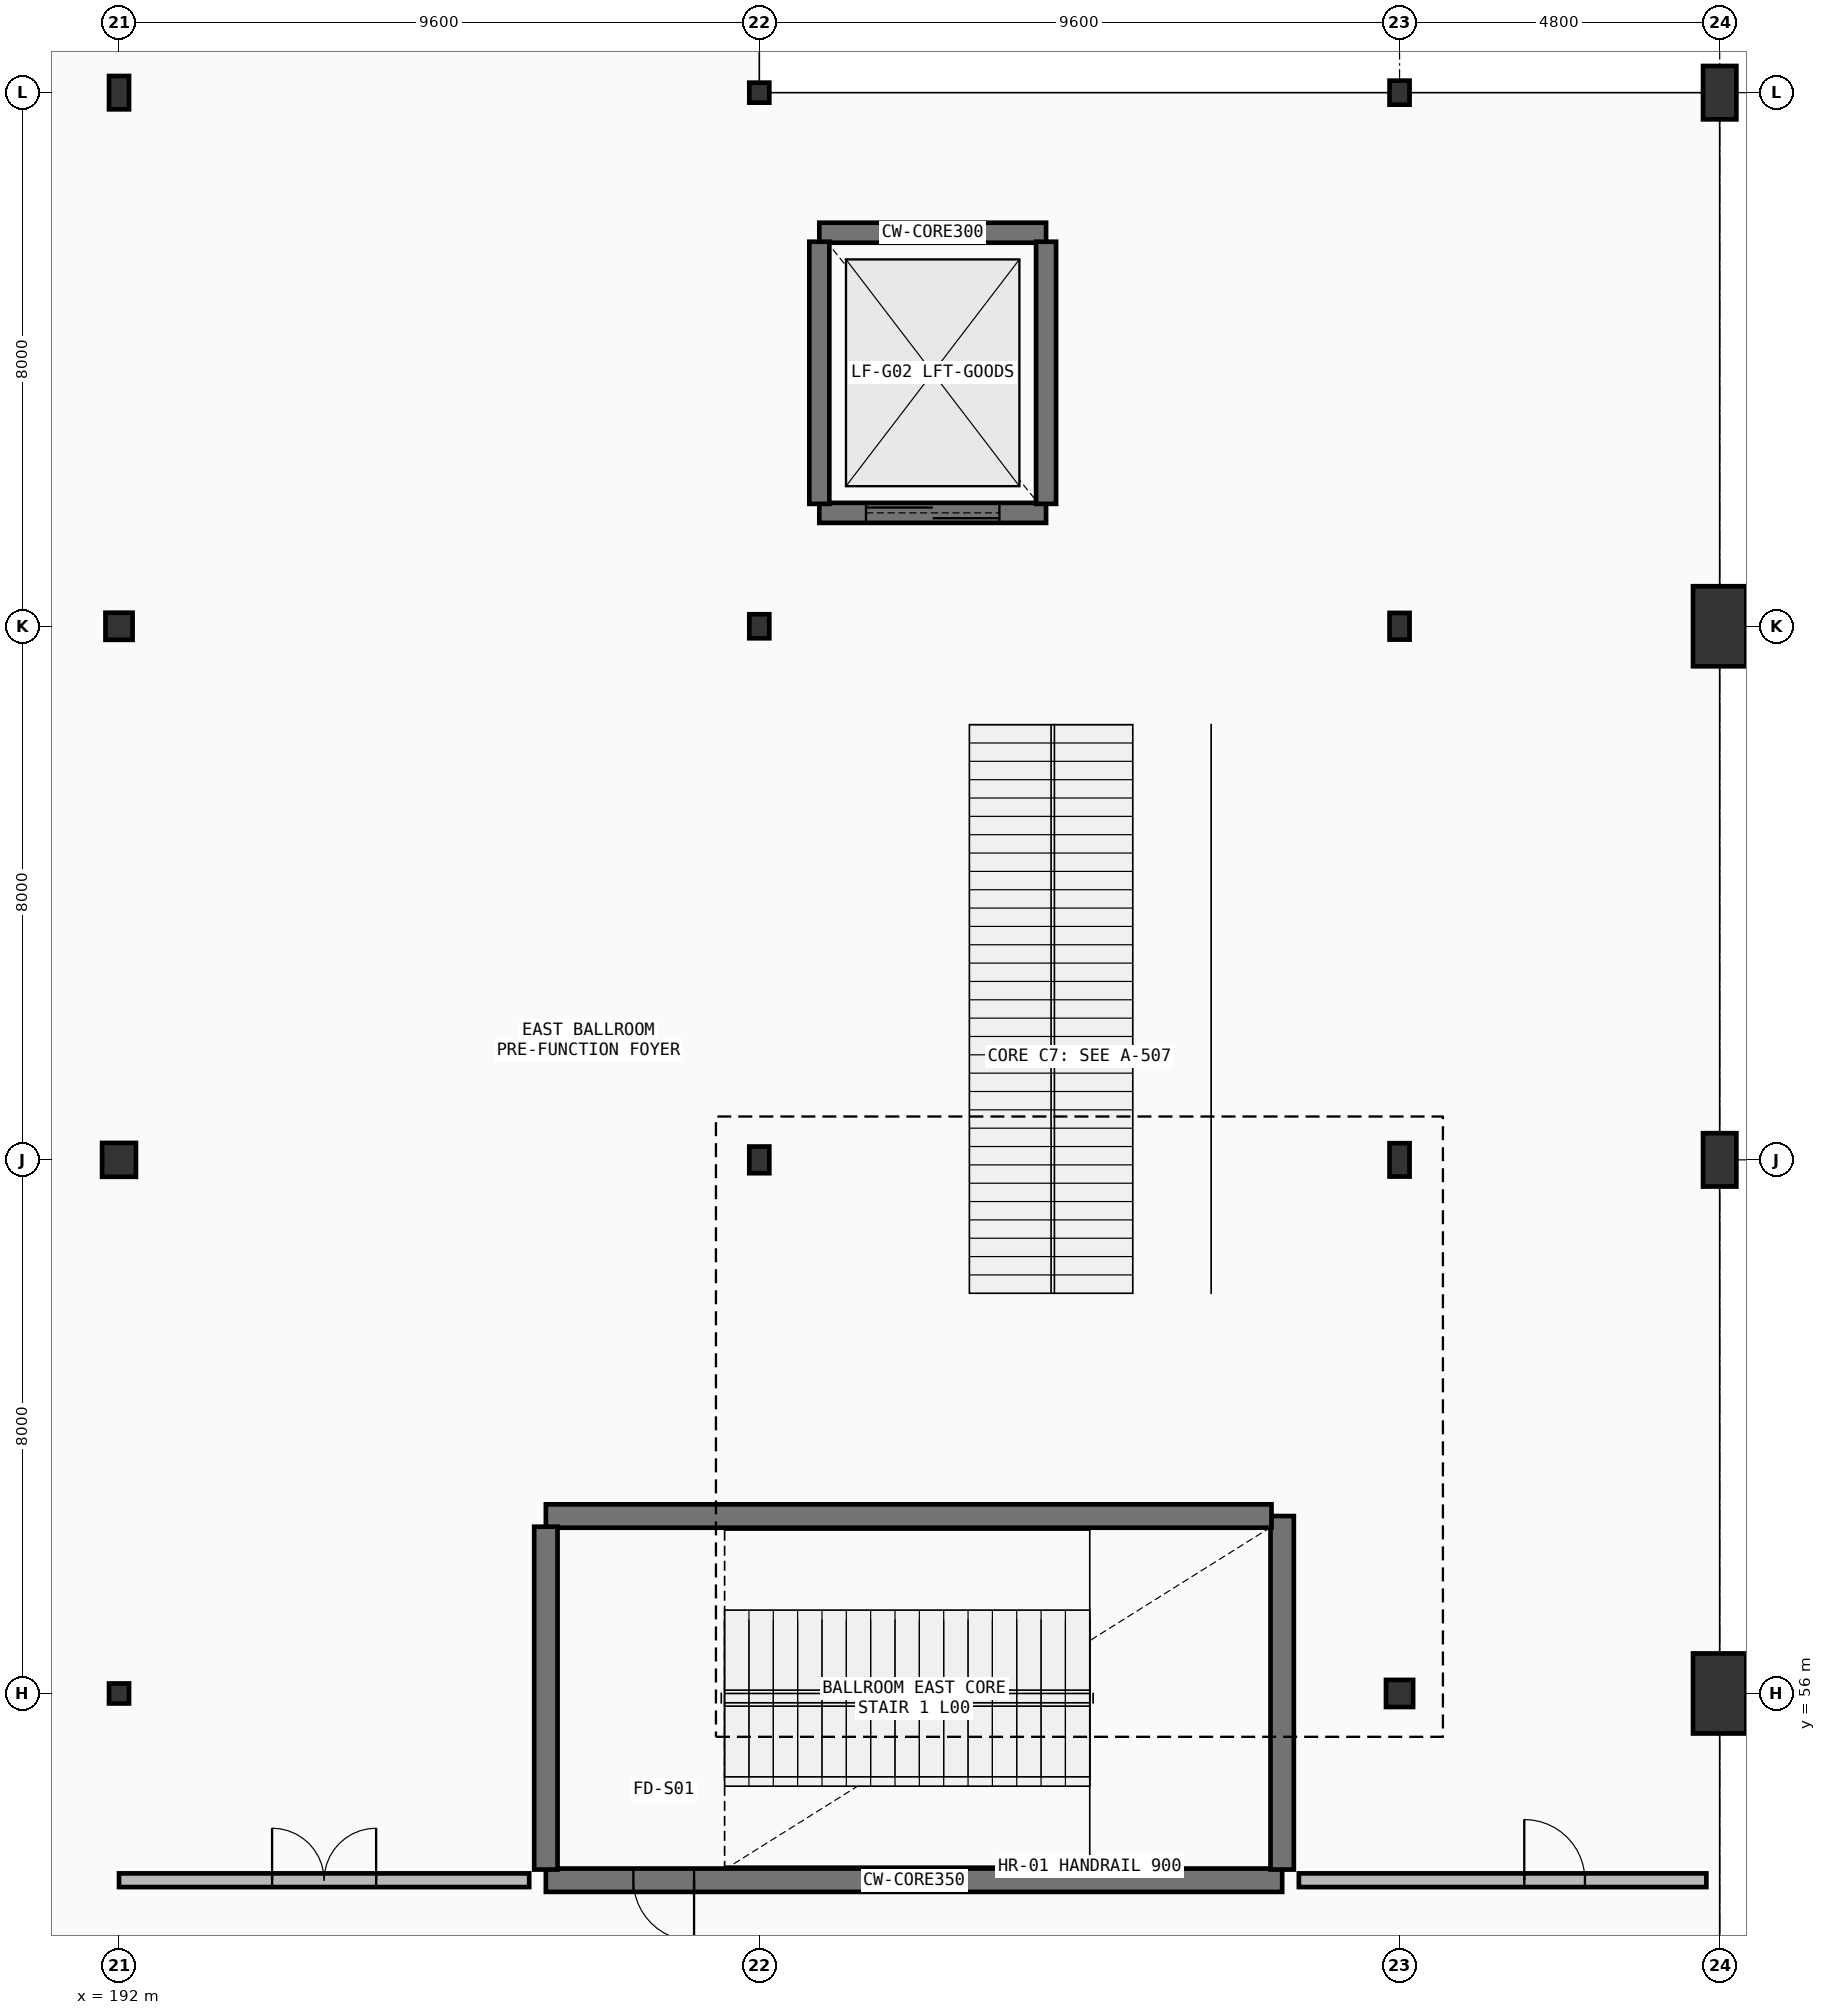
"""IFC4 building model, lengths in metres.
Left out: names, types, materials, properties, quantities, classifications, styles, units other than length and angle.
Written with IfcOpenShell. Run it as: python <this file> out.ifc"""

import sys

from ifc_helpers import new_model, si_unit, direction, frame, frame_2d, origin, origin_2d, place, context, subcontext, project, spatial, rectangle, hollow_circle, i_section, extrude, element, fill, save


model = new_model("IFC4")
c1 = context("Model", 3, precision=1e-05, world=origin(), true_north=direction((0.0, 1.0)))
c2 = subcontext(c1, "Body", "Model", "MODEL_VIEW")
j1 = project(units=[si_unit("LENGTHUNIT", "METRE"), si_unit("PLANEANGLEUNIT", "RADIAN")], contexts=[c1])
p1 = place(None, origin())
s1 = spatial("IfcSite", under=j1, at=p1, CompositionType="ELEMENT")
p2 = place(p1, origin())
s2 = spatial("IfcBuilding", under=s1, at=p2, CompositionType="ELEMENT")
p3 = place(p2, origin())
s3 = spatial("IfcBuildingStorey", under=s2, at=p3, CompositionType="ELEMENT", Elevation=0.0)
p4 = place(p3, frame((192.0, 56.0, 0.0), z_axis=(0.0, 0.0, 1.0), x_axis=(1.0, 0.0, 0.0)))
e1 = element("IfcColumn", 1, at=p4, inside=s3, PredefinedType="COLUMN", context=c2, shape_type="SweptSolid", body=[
    extrude(i_section(OverallWidth=0.3, OverallDepth=0.3, WebThickness=0.011, FlangeThickness=0.019, FilletRadius=0.027, at=origin_2d()), origin(), (0.0, 0.0, 1.0), 6.0),
])
p5 = place(p3, frame((192.0, 64.0, 0.0), z_axis=(0.0, 0.0, 1.0), x_axis=(1.0, 0.0, 0.0)))
e2 = element("IfcColumn", 2, at=p5, inside=s3, PredefinedType="COLUMN", context=c2, shape_type="SweptSolid", body=[
    extrude(hollow_circle(Radius=0.254, WallThickness=0.025, at=origin_2d()), origin(), (0.0, 0.0, 1.0), 6.0),
])
p6 = place(p3, frame((192.0, 72.0, 0.0), z_axis=(0.0, 0.0, 1.0), x_axis=(1.0, 0.0, 0.0)))
e3 = element("IfcColumn", 3, at=p6, inside=s3, PredefinedType="COLUMN", context=c2, shape_type="SweptSolid", body=[
    extrude(hollow_circle(Radius=0.203, WallThickness=0.02, at=origin_2d()), origin(), (0.0, 0.0, 1.0), 6.0),
])
p7 = place(p3, frame((192.0, 80.0, 0.0), z_axis=(0.0, 0.0, 1.0), x_axis=(1.0, 0.0, 0.0)))
e4 = element("IfcColumn", 4, at=p7, inside=s3, PredefinedType="COLUMN", context=c2, shape_type="SweptSolid", body=[
    extrude(i_section(OverallWidth=0.3, OverallDepth=0.5, WebThickness=0.014, FlangeThickness=0.028, FilletRadius=0.027, at=origin_2d()), origin(), (0.0, 0.0, 1.0), 6.0),
])
p8 = place(p3, frame((201.6, 64.0, 0.0), z_axis=(0.0, 0.0, 1.0), x_axis=(1.0, 0.0, 0.0)))
e5 = element("IfcColumn", 5, at=p8, inside=s3, PredefinedType="COLUMN", context=c2, shape_type="SweptSolid", body=[
    extrude(i_section(OverallWidth=0.3, OverallDepth=0.4, WebThickness=0.013, FlangeThickness=0.024, FilletRadius=0.027, at=origin_2d()), origin(), (0.0, 0.0, 1.0), 6.0),
])
p9 = place(p3, frame((201.6, 72.0, 0.0), z_axis=(0.0, 0.0, 1.0), x_axis=(1.0, 0.0, 0.0)))
e6 = element("IfcColumn", 6, at=p9, inside=s3, PredefinedType="COLUMN", context=c2, shape_type="SweptSolid", body=[
    extrude(i_section(OverallWidth=0.3, OverallDepth=0.36, WebThickness=0.012, FlangeThickness=0.022, FilletRadius=0.027, at=origin_2d()), origin(), (0.0, 0.0, 1.0), 6.0),
])
p10 = place(p3, frame((201.6, 80.0, 0.0), z_axis=(0.0, 0.0, 1.0), x_axis=(1.0, 0.0, 0.0)))
e7 = element("IfcColumn", 7, at=p10, inside=s3, PredefinedType="COLUMN", context=c2, shape_type="SweptSolid", body=[
    extrude(i_section(OverallWidth=0.3, OverallDepth=0.3, WebThickness=0.011, FlangeThickness=0.019, FilletRadius=0.027, at=origin_2d()), origin(), (0.0, 0.0, 1.0), 6.0),
])
p11 = place(p3, frame((211.2, 56.0, 0.0), z_axis=(0.0, 0.0, 1.0), x_axis=(1.0, 0.0, 0.0)))
e8 = element("IfcColumn", 8, at=p11, inside=s3, PredefinedType="COLUMN", context=c2, shape_type="SweptSolid", body=[
    extrude(hollow_circle(Radius=0.203, WallThickness=0.02, at=origin_2d()), origin(), (0.0, 0.0, 1.0), 6.0),
])
p12 = place(p3, frame((211.2, 64.0, 0.0), z_axis=(0.0, 0.0, 1.0), x_axis=(1.0, 0.0, 0.0)))
e9 = element("IfcColumn", 9, at=p12, inside=s3, PredefinedType="COLUMN", context=c2, shape_type="SweptSolid", body=[
    extrude(i_section(OverallWidth=0.3, OverallDepth=0.5, WebThickness=0.014, FlangeThickness=0.028, FilletRadius=0.027, at=origin_2d()), origin(), (0.0, 0.0, 1.0), 6.0),
])
p13 = place(p3, frame((211.2, 72.0, 0.0), z_axis=(0.0, 0.0, 1.0), x_axis=(1.0, 0.0, 0.0)))
e10 = element("IfcColumn", 10, at=p13, inside=s3, PredefinedType="COLUMN", context=c2, shape_type="SweptSolid", body=[
    extrude(i_section(OverallWidth=0.3, OverallDepth=0.4, WebThickness=0.013, FlangeThickness=0.024, FilletRadius=0.027, at=origin_2d()), origin(), (0.0, 0.0, 1.0), 6.0),
])
p14 = place(p3, frame((211.2, 80.0, 0.0), z_axis=(0.0, 0.0, 1.0), x_axis=(1.0, 0.0, 0.0)))
e11 = element("IfcColumn", 11, at=p14, inside=s3, PredefinedType="COLUMN", context=c2, shape_type="SweptSolid", body=[
    extrude(i_section(OverallWidth=0.3, OverallDepth=0.36, WebThickness=0.012, FlangeThickness=0.022, FilletRadius=0.027, at=origin_2d()), origin(), (0.0, 0.0, 1.0), 6.0),
])
p15 = place(p3, frame((216.0, 56.0, -5.4), z_axis=(0.0, 0.0, 1.0), x_axis=(1.0, 0.0, 0.0)))
e12 = element("IfcColumn", 12, at=p15, inside=s3, PredefinedType="PILASTER", context=c2, shape_type="SweptSolid", body=[
    extrude(rectangle(XDim=0.8, YDim=1.2, at=origin_2d()), origin(), (0.0, 0.0, 1.0), 11.4),
])
p16 = place(p3, frame((216.0, 64.0, -5.4), z_axis=(0.0, 0.0, 1.0), x_axis=(1.0, 0.0, 0.0)))
e13 = element("IfcColumn", 13, at=p16, inside=s3, PredefinedType="PILASTER", context=c2, shape_type="SweptSolid", body=[
    extrude(rectangle(XDim=0.5, YDim=0.8, at=origin_2d()), origin(), (0.0, 0.0, 1.0), 11.4),
])
p17 = place(p3, frame((216.0, 72.0, -5.4), z_axis=(0.0, 0.0, 1.0), x_axis=(1.0, 0.0, 0.0)))
e14 = element("IfcColumn", 14, at=p17, inside=s3, PredefinedType="PILASTER", context=c2, shape_type="SweptSolid", body=[
    extrude(rectangle(XDim=0.8, YDim=1.2, at=origin_2d()), origin(), (0.0, 0.0, 1.0), 11.4),
])
p18 = place(p3, frame((216.0, 80.0, -5.4), z_axis=(0.0, 0.0, 1.0), x_axis=(1.0, 0.0, 0.0)))
e15 = element("IfcColumn", 15, at=p18, inside=s3, PredefinedType="PILASTER", context=c2, shape_type="SweptSolid", body=[
    extrude(rectangle(XDim=0.5, YDim=0.8, at=origin_2d()), origin(), (0.0, 0.0, 1.0), 11.4),
])
p19 = place(p3, frame((209.44, 53.2, 0.0), z_axis=(0.0, 0.0, 1.0), x_axis=(-1.0, 0.0, 0.0)))
e16 = element("IfcWall", 16, at=p19, inside=s3, PredefinedType="SHEAR", context=c2, shape_type="SweptSolid", body=[
    extrude(rectangle(XDim=11.04, YDim=0.35, at=frame_2d((5.52, 0.0))), origin(), (0.0, 0.0, 1.0), 5.75),
])
p20 = place(p19, frame((8.818, 0.0, 0.0)))
e17 = element("IfcOpeningElement", 17, at=p20, cuts=e16, PredefinedType="OPENING", context=c2, shape_type="SweptSolid", body=[
    extrude(rectangle(XDim=0.91, YDim=2.08, at=frame_2d((0.455, 1.04))), frame((0.0, 0.185, 0.0), z_axis=(0.0, -1.0, 0.0), x_axis=(1.0, 0.0, 0.0)), (0.0, 0.0, 1.0), 0.37),
])
p21 = place(p3, frame((209.44, 58.66, 0.0), z_axis=(0.0, 0.0, 1.0), x_axis=(0.0, -1.0, 0.0)))
e18 = element("IfcWall", 18, at=p21, inside=s3, PredefinedType="SHEAR", context=c2, shape_type="SweptSolid", body=[
    extrude(rectangle(XDim=5.3, YDim=0.35, at=frame_2d((2.65, 0.0))), origin(), (0.0, 0.0, 1.0), 5.75),
])
p22 = place(p3, frame((198.4, 58.66, 0.0), z_axis=(0.0, 0.0, 1.0), x_axis=(1.0, 0.0, 0.0)))
e19 = element("IfcWall", 19, at=p22, inside=s3, PredefinedType="SHEAR", context=c2, shape_type="SweptSolid", body=[
    extrude(rectangle(XDim=10.88, YDim=0.35, at=frame_2d((5.44, 0.0))), origin(), (0.0, 0.0, 1.0), 5.75),
])
p23 = place(p3, frame((198.4, 53.36, 0.0), z_axis=(0.0, 0.0, 1.0), x_axis=(0.0, 1.0, 0.0)))
e20 = element("IfcWall", 20, at=p23, inside=s3, PredefinedType="SHEAR", context=c2, shape_type="SweptSolid", body=[
    extrude(rectangle(XDim=5.14, YDim=0.35, at=frame_2d((2.57, 0.0))), origin(), (0.0, 0.0, 1.0), 5.75),
])
p24 = place(p3, frame((205.9, 77.9, 0.0), z_axis=(0.0, 0.0, 1.0), x_axis=(-1.0, 0.0, 0.0)))
e21 = element("IfcWall", 21, at=p24, inside=s3, PredefinedType="SHEAR", context=c2, shape_type="SweptSolid", body=[
    extrude(rectangle(XDim=3.4, YDim=0.3, at=frame_2d((1.7, 0.0))), origin(), (0.0, 0.0, 1.0), 5.75),
])
p25 = place(p3, frame((202.5, 73.7, 0.0), z_axis=(0.0, 0.0, 1.0), x_axis=(1.0, 0.0, 0.0)))
e22 = element("IfcWall", 22, at=p25, inside=s3, PredefinedType="SHEAR", context=c2, shape_type="SweptSolid", body=[
    extrude(rectangle(XDim=3.4, YDim=0.3, at=frame_2d((1.7, 0.0))), origin(), (0.0, 0.0, 1.0), 5.75),
])
p26 = place(p25, frame((0.7, 0.0, 0.0)))
e23 = element("IfcOpeningElement", 23, at=p26, cuts=e22, PredefinedType="OPENING", context=c2, shape_type="SweptSolid", body=[
    extrude(rectangle(XDim=2.0, YDim=2.5, at=frame_2d((1.0, 1.25))), frame((0.0, 0.16, 0.0), z_axis=(0.0, -1.0, 0.0), x_axis=(1.0, 0.0, 0.0)), (0.0, 0.0, 1.0), 0.32),
])
for number, where, z_axis, x_axis in (
    (24, (205.9, 73.835, 0.0), (0.0, 0.0, 1.0), (0.0, 1.0, 0.0)),
    (25, (202.5, 77.765, 0.0), (0.0, 0.0, 1.0), (0.0, -1.0, 0.0)),
):
    element("IfcWall", number, at=place(p3, frame(where, z_axis=z_axis, x_axis=x_axis)), inside=s3, PredefinedType="SHEAR", context=c2, shape_type="SweptSolid", body=[
        extrude(rectangle(XDim=3.93, YDim=0.3, at=frame_2d((1.965, 0.0))), origin(), (0.0, 0.0, 1.0), 5.75),
    ])
p27 = place(p3, frame((192.0, 53.2, 0.0), z_axis=(0.0, 0.0, 1.0), x_axis=(1.0, 0.0, 0.0)))
e26 = element("IfcWall", 26, at=p27, inside=s3, PredefinedType="SOLIDWALL", context=c2, shape_type="SweptSolid", body=[
    extrude(rectangle(XDim=6.15, YDim=0.205, at=frame_2d((3.075, 0.0))), origin(), (0.0, 0.0, 1.0), 5.32),
])
p28 = place(p27, frame((2.295, 0.0, 0.0)))
e27 = element("IfcOpeningElement", 27, at=p28, cuts=e26, PredefinedType="OPENING", context=c2, shape_type="SweptSolid", body=[
    extrude(rectangle(XDim=1.56, YDim=2.18, at=frame_2d((0.78, 1.09))), frame((0.0, 0.113, 0.0), z_axis=(0.0, -1.0, 0.0), x_axis=(1.0, 0.0, 0.0)), (0.0, 0.0, 1.0), 0.225),
])
p29 = place(p3, frame((209.69, 53.2, 0.0), z_axis=(0.0, 0.0, 1.0), x_axis=(1.0, 0.0, 0.0)))
e28 = element("IfcWall", 28, at=p29, inside=s3, PredefinedType="SOLIDWALL", context=c2, shape_type="SweptSolid", body=[
    extrude(rectangle(XDim=6.11, YDim=0.205, at=frame_2d((3.055, 0.0))), origin(), (0.0, 0.0, 1.0), 4.82),
])
p30 = place(p29, frame((3.38, 0.0, 0.0)))
e29 = element("IfcOpeningElement", 29, at=p30, cuts=e28, PredefinedType="OPENING", context=c2, shape_type="SweptSolid", body=[
    extrude(rectangle(XDim=0.91, YDim=2.08, at=frame_2d((0.455, 1.04))), frame((0.0, 0.113, 0.0), z_axis=(0.0, -1.0, 0.0), x_axis=(1.0, 0.0, 0.0)), (0.0, 0.0, 1.0), 0.225),
])
p31 = place(p20, origin())
e30 = element("IfcDoor", 30, at=p31, inside=s3, OperationType="SINGLE_SWING_LEFT", PredefinedType="DOOR", context=c2, shape_type="SweptSolid", body=[
    extrude(rectangle(XDim=0.91, YDim=2.08, at=frame_2d((0.455, 1.04))), frame((0.0, 0.025, 0.0), z_axis=(0.0, -1.0, 0.0), x_axis=(1.0, 0.0, 0.0)), (0.0, 0.0, 1.0), 0.05),
])
fill(e17, e30)
p32 = place(p26, origin())
e31 = element("IfcDoor", 31, at=p32, inside=s3, OperationType="DOUBLE_DOOR_SLIDING", PredefinedType="DOOR", context=c2, shape_type="SweptSolid", body=[
    extrude(rectangle(XDim=2.0, YDim=2.5, at=frame_2d((1.0, 1.25))), frame((0.0, 0.025, 0.0), z_axis=(0.0, -1.0, 0.0), x_axis=(1.0, 0.0, 0.0)), (0.0, 0.0, 1.0), 0.05),
])
fill(e23, e31)
p33 = place(p28, origin())
e32 = element("IfcDoor", 32, at=p33, inside=s3, OperationType="DOUBLE_DOOR_SINGLE_SWING", PredefinedType="DOOR", context=c2, shape_type="SweptSolid", body=[
    extrude(rectangle(XDim=1.56, YDim=2.18, at=frame_2d((0.78, 1.09))), frame((0.0, 0.025, 0.0), z_axis=(0.0, -1.0, 0.0), x_axis=(1.0, 0.0, 0.0)), (0.0, 0.0, 1.0), 0.05),
])
fill(e27, e32)
p34 = place(p30, origin())
e33 = element("IfcDoor", 33, at=p34, inside=s3, OperationType="SINGLE_SWING_RIGHT", PredefinedType="DOOR", context=c2, shape_type="SweptSolid", body=[
    extrude(rectangle(XDim=0.91, YDim=2.08, at=frame_2d((0.455, 1.04))), frame((0.0, 0.025, 0.0), z_axis=(0.0, -1.0, 0.0), x_axis=(1.0, 0.0, 0.0)), (0.0, 0.0, 1.0), 0.05),
])
fill(e29, e33)
save(model, sys.argv[1])
